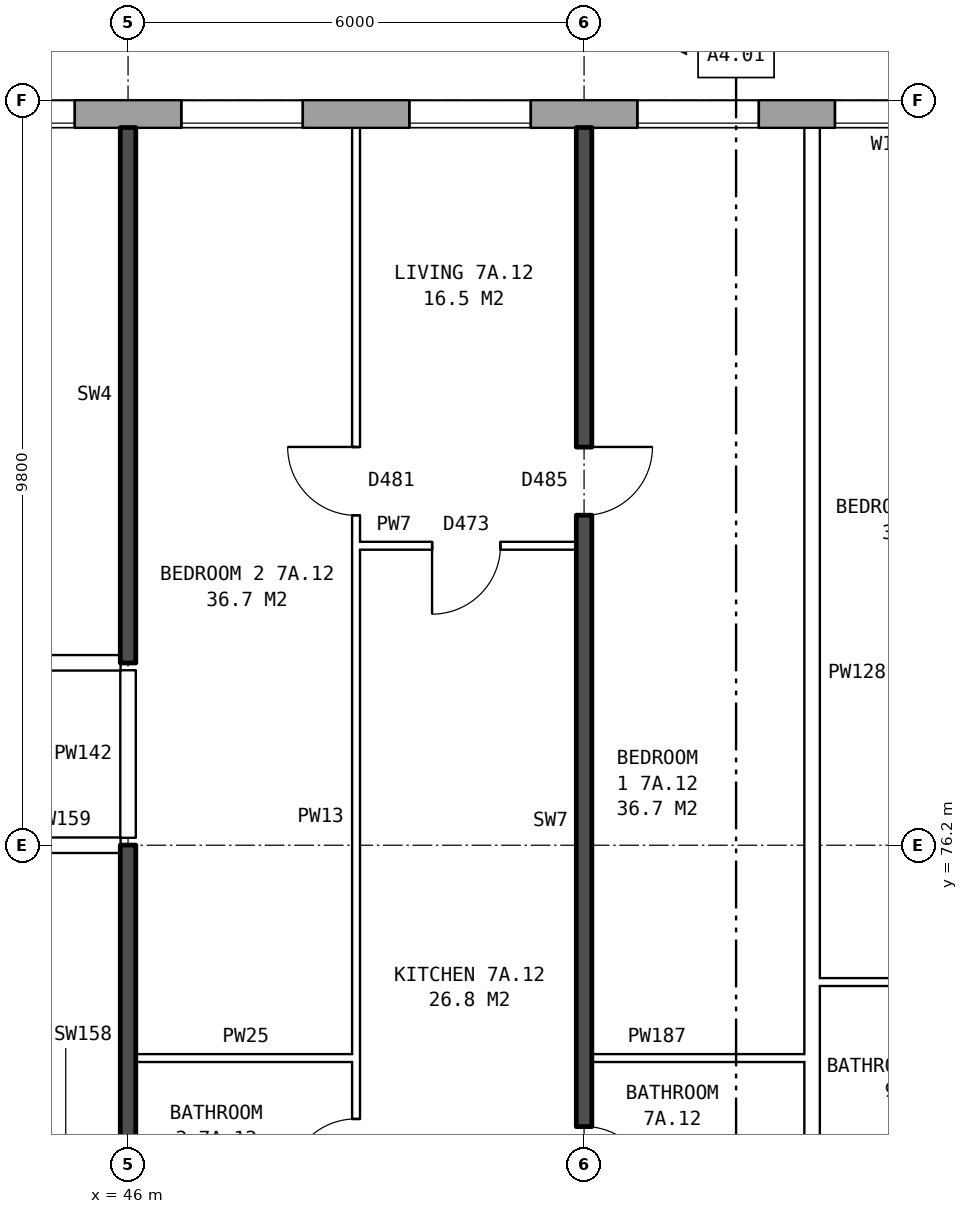
"""IFC4 building model, lengths in metres.
Left out: names, types, materials, properties, quantities, classifications, styles, units other than length and angle.
Written with IfcOpenShell. Run it as: python <this file> out.ifc"""

import sys

from ifc_helpers import new_model, si_unit, direction, frame, frame_2d, origin, place, context, subcontext, project, spatial, rectangle, extrude, element, fill, save


model = new_model("IFC4")
c1 = context("Model", 3, precision=1e-05, world=origin(), true_north=direction((0.0, 1.0)))
c2 = subcontext(c1, "Body", "Model", "MODEL_VIEW")
j1 = project(units=[si_unit("LENGTHUNIT", "METRE"), si_unit("PLANEANGLEUNIT", "RADIAN")], contexts=[c1])
p1 = place(None, origin())
s1 = spatial("IfcSite", under=j1, at=p1, CompositionType="ELEMENT")
p2 = place(p1, origin())
s2 = spatial("IfcBuilding", under=s1, at=p2, CompositionType="ELEMENT")
p3 = place(p2, frame((0.0, 0.0, 28.8)))
s3 = spatial("IfcBuildingStorey", under=s2, at=p3, CompositionType="ELEMENT", Elevation=28.8)
p4 = place(p3, frame((72.925, 85.82, 0.0), z_axis=(0.0, 0.0, 1.0), x_axis=(-1.0, 0.0, 0.0)))
e1 = element("IfcWall", 1, at=p4, inside=s3, PredefinedType="STANDARD", context=c2, shape_type="SweptSolid", body=[
    extrude(rectangle(XDim=50.101, YDim=0.36, at=frame_2d((25.05, 0.0))), origin(), (0.0, 0.0, 1.0), 2.85),
])
p5 = place(p4, frame((0.625, 0.0, 0.8)))
e2 = element("IfcOpeningElement", 2, at=p5, cuts=e1, PredefinedType="OPENING", context=c2, shape_type="SweptSolid", body=[
    extrude(rectangle(XDim=1.6, YDim=1.8, at=frame_2d((0.8, 0.9))), frame((0.0, 0.19, 0.0), z_axis=(0.0, -1.0, 0.0), x_axis=(1.0, 0.0, 0.0)), (0.0, 0.0, 1.0), 0.38),
])
p6 = place(p4, frame((3.625, 0.0, 0.8)))
e3 = element("IfcOpeningElement", 3, at=p6, cuts=e1, PredefinedType="OPENING", context=c2, shape_type="SweptSolid", body=[
    extrude(rectangle(XDim=1.6, YDim=1.8, at=frame_2d((0.8, 0.9))), frame((0.0, 0.19, 0.0), z_axis=(0.0, -1.0, 0.0), x_axis=(1.0, 0.0, 0.0)), (0.0, 0.0, 1.0), 0.38),
])
p7 = place(p4, frame((6.625, 0.0, 0.8)))
e4 = element("IfcOpeningElement", 4, at=p7, cuts=e1, PredefinedType="OPENING", context=c2, shape_type="SweptSolid", body=[
    extrude(rectangle(XDim=1.6, YDim=1.8, at=frame_2d((0.8, 0.9))), frame((0.0, 0.19, 0.0), z_axis=(0.0, -1.0, 0.0), x_axis=(1.0, 0.0, 0.0)), (0.0, 0.0, 1.0), 0.38),
])
p8 = place(p4, frame((9.625, 0.0, 0.8)))
e5 = element("IfcOpeningElement", 5, at=p8, cuts=e1, PredefinedType="OPENING", context=c2, shape_type="SweptSolid", body=[
    extrude(rectangle(XDim=1.6, YDim=1.8, at=frame_2d((0.8, 0.9))), frame((0.0, 0.19, 0.0), z_axis=(0.0, -1.0, 0.0), x_axis=(1.0, 0.0, 0.0)), (0.0, 0.0, 1.0), 0.38),
])
p9 = place(p4, frame((12.075, 0.0, 1.65)))
e6 = element("IfcOpeningElement", 6, at=p9, cuts=e1, PredefinedType="OPENING", context=c2, shape_type="SweptSolid", body=[
    extrude(rectangle(XDim=1.2, YDim=0.9, at=frame_2d((0.6, 0.45))), frame((0.0, 0.19, 0.0), z_axis=(0.0, -1.0, 0.0), x_axis=(1.0, 0.0, 0.0)), (0.0, 0.0, 1.0), 0.38),
])
p10 = place(p4, frame((15.325, 0.0, 0.8)))
e7 = element("IfcOpeningElement", 7, at=p10, cuts=e1, PredefinedType="OPENING", context=c2, shape_type="SweptSolid", body=[
    extrude(rectangle(XDim=0.6, YDim=1.2, at=frame_2d((0.3, 0.6))), frame((0.0, 0.19, 0.0), z_axis=(0.0, -1.0, 0.0), x_axis=(1.0, 0.0, 0.0)), (0.0, 0.0, 1.0), 0.38),
])
p11 = place(p4, frame((18.625, 0.0, 0.8)))
e8 = element("IfcOpeningElement", 8, at=p11, cuts=e1, PredefinedType="OPENING", context=c2, shape_type="SweptSolid", body=[
    extrude(rectangle(XDim=1.6, YDim=1.8, at=frame_2d((0.8, 0.9))), frame((0.0, 0.19, 0.0), z_axis=(0.0, -1.0, 0.0), x_axis=(1.0, 0.0, 0.0)), (0.0, 0.0, 1.0), 0.38),
])
p12 = place(p4, frame((21.625, 0.0, 0.8)))
e9 = element("IfcOpeningElement", 9, at=p12, cuts=e1, PredefinedType="OPENING", context=c2, shape_type="SweptSolid", body=[
    extrude(rectangle(XDim=1.6, YDim=1.8, at=frame_2d((0.8, 0.9))), frame((0.0, 0.19, 0.0), z_axis=(0.0, -1.0, 0.0), x_axis=(1.0, 0.0, 0.0)), (0.0, 0.0, 1.0), 0.38),
])
p13 = place(p4, frame((24.625, 0.0, 0.8)))
e10 = element("IfcOpeningElement", 10, at=p13, cuts=e1, PredefinedType="OPENING", context=c2, shape_type="SweptSolid", body=[
    extrude(rectangle(XDim=1.6, YDim=1.8, at=frame_2d((0.8, 0.9))), frame((0.0, 0.19, 0.0), z_axis=(0.0, -1.0, 0.0), x_axis=(1.0, 0.0, 0.0)), (0.0, 0.0, 1.0), 0.38),
])
p14 = place(p4, frame((27.625, 0.0, 0.8)))
e11 = element("IfcOpeningElement", 11, at=p14, cuts=e1, PredefinedType="OPENING", context=c2, shape_type="SweptSolid", body=[
    extrude(rectangle(XDim=1.6, YDim=1.8, at=frame_2d((0.8, 0.9))), frame((0.0, 0.19, 0.0), z_axis=(0.0, -1.0, 0.0), x_axis=(1.0, 0.0, 0.0)), (0.0, 0.0, 1.0), 0.38),
])
p15 = place(p4, frame((30.625, 0.0, 0.8)))
e12 = element("IfcOpeningElement", 12, at=p15, cuts=e1, PredefinedType="OPENING", context=c2, shape_type="SweptSolid", body=[
    extrude(rectangle(XDim=1.6, YDim=1.8, at=frame_2d((0.8, 0.9))), frame((0.0, 0.19, 0.0), z_axis=(0.0, -1.0, 0.0), x_axis=(1.0, 0.0, 0.0)), (0.0, 0.0, 1.0), 0.38),
])
p16 = place(p4, frame((33.125, 0.0, 0.8)))
e13 = element("IfcOpeningElement", 13, at=p16, cuts=e1, PredefinedType="OPENING", context=c2, shape_type="SweptSolid", body=[
    extrude(rectangle(XDim=1.2, YDim=1.5, at=frame_2d((0.6, 0.75))), frame((0.0, 0.19, 0.0), z_axis=(0.0, -1.0, 0.0), x_axis=(1.0, 0.0, 0.0)), (0.0, 0.0, 1.0), 0.38),
])
p17 = place(p4, frame((36.675, 0.0, 1.7)))
e14 = element("IfcOpeningElement", 14, at=p17, cuts=e1, PredefinedType="OPENING", context=c2, shape_type="SweptSolid", body=[
    extrude(rectangle(XDim=0.6, YDim=0.9, at=frame_2d((0.3, 0.45))), frame((0.0, 0.19, 0.0), z_axis=(0.0, -1.0, 0.0), x_axis=(1.0, 0.0, 0.0)), (0.0, 0.0, 1.0), 0.38),
])
p18 = place(p4, frame((39.625, 0.0, 0.8)))
e15 = element("IfcOpeningElement", 15, at=p18, cuts=e1, PredefinedType="OPENING", context=c2, shape_type="SweptSolid", body=[
    extrude(rectangle(XDim=1.6, YDim=1.8, at=frame_2d((0.8, 0.9))), frame((0.0, 0.19, 0.0), z_axis=(0.0, -1.0, 0.0), x_axis=(1.0, 0.0, 0.0)), (0.0, 0.0, 1.0), 0.38),
])
p19 = place(p4, frame((42.625, 0.0, 0.8)))
e16 = element("IfcOpeningElement", 16, at=p19, cuts=e1, PredefinedType="OPENING", context=c2, shape_type="SweptSolid", body=[
    extrude(rectangle(XDim=1.6, YDim=1.8, at=frame_2d((0.8, 0.9))), frame((0.0, 0.19, 0.0), z_axis=(0.0, -1.0, 0.0), x_axis=(1.0, 0.0, 0.0)), (0.0, 0.0, 1.0), 0.38),
])
p20 = place(p4, frame((45.625, 0.0, 0.8)))
e17 = element("IfcOpeningElement", 17, at=p20, cuts=e1, PredefinedType="OPENING", context=c2, shape_type="SweptSolid", body=[
    extrude(rectangle(XDim=1.6, YDim=1.8, at=frame_2d((0.8, 0.9))), frame((0.0, 0.19, 0.0), z_axis=(0.0, -1.0, 0.0), x_axis=(1.0, 0.0, 0.0)), (0.0, 0.0, 1.0), 0.38),
])
p21 = place(p4, frame((13.875, 0.0, 0.15)))
e18 = element("IfcOpeningElement", 18, at=p21, cuts=e1, PredefinedType="OPENING", context=c2, shape_type="SweptSolid", body=[
    extrude(rectangle(XDim=0.8, YDim=0.9, at=frame_2d((0.4, 0.45))), frame((0.0, 0.19, 0.0), z_axis=(0.0, -1.0, 0.0), x_axis=(1.0, 0.0, 0.0)), (0.0, 0.0, 1.0), 0.38),
])
p22 = place(p4, frame((16.225, 0.0, 0.8)))
e19 = element("IfcOpeningElement", 19, at=p22, cuts=e1, PredefinedType="OPENING", context=c2, shape_type="SweptSolid", body=[
    extrude(rectangle(XDim=1.4, YDim=1.8, at=frame_2d((0.7, 0.9))), frame((0.0, 0.19, 0.0), z_axis=(0.0, -1.0, 0.0), x_axis=(1.0, 0.0, 0.0)), (0.0, 0.0, 1.0), 0.38),
])
p23 = place(p4, frame((34.625, 0.0, 0.8)))
e20 = element("IfcOpeningElement", 20, at=p23, cuts=e1, PredefinedType="OPENING", context=c2, shape_type="SweptSolid", body=[
    extrude(rectangle(XDim=0.6, YDim=0.9, at=frame_2d((0.3, 0.45))), frame((0.0, 0.19, 0.0), z_axis=(0.0, -1.0, 0.0), x_axis=(1.0, 0.0, 0.0)), (0.0, 0.0, 1.0), 0.38),
])
p24 = place(p4, frame((37.575, 0.0, 1.1)))
e21 = element("IfcOpeningElement", 21, at=p24, cuts=e1, PredefinedType="OPENING", context=c2, shape_type="SweptSolid", body=[
    extrude(rectangle(XDim=1.0, YDim=1.5, at=frame_2d((0.5, 0.75))), frame((0.0, 0.19, 0.0), z_axis=(0.0, -1.0, 0.0), x_axis=(1.0, 0.0, 0.0)), (0.0, 0.0, 1.0), 0.38),
])
p25 = place(p3, frame((46.1, 73.4, 0.0), z_axis=(0.0, 0.0, 1.0), x_axis=(1.0, 0.0, 0.0)))
e22 = element("IfcWall", 22, at=p25, inside=s3, PredefinedType="PARTITIONING", context=c2, shape_type="SweptSolid", body=[
    extrude(rectangle(XDim=2.9, YDim=0.1, at=frame_2d((1.45, 0.0))), origin(), (0.0, 0.0, 1.0), 2.85),
])
for number, where, z_axis, x_axis in (
    (23, (52.1, 73.4, 0.0), (0.0, 0.0, 1.0), (1.0, 0.0, 0.0)),
    (24, (55.1, 74.4, 0.0), (0.0, 0.0, 1.0), (1.0, 0.0, 0.0)),
):
    element("IfcWall", number, at=place(p3, frame(where, z_axis=z_axis, x_axis=x_axis)), inside=s3, PredefinedType="PARTITIONING", context=c2, shape_type="SweptSolid", body=[
        extrude(rectangle(XDim=2.8, YDim=0.1, at=frame_2d((1.4, 0.0))), origin(), (0.0, 0.0, 1.0), 2.85),
    ])
p26 = place(p3, frame((44.36, 76.2, 0.0), z_axis=(0.0, 0.0, 1.0), x_axis=(1.0, 0.0, 0.0)))
e25 = element("IfcWall", 25, at=p26, inside=s3, PredefinedType="PARTITIONING", context=c2, shape_type="SweptSolid", body=[
    extrude(rectangle(XDim=1.54, YDim=0.2, at=frame_2d((0.77, 0.0))), origin(), (0.0, 0.0, 1.0), 2.85),
])
p27 = place(p3, frame((20.11, 78.6, 0.0), z_axis=(0.0, 0.0, 1.0), x_axis=(1.0, 0.0, 0.0)))
e26 = element("IfcWall", 26, at=p27, inside=s3, PredefinedType="PARTITIONING", context=c2, shape_type="SweptSolid", body=[
    extrude(rectangle(XDim=25.79, YDim=0.2, at=frame_2d((12.895, 0.0))), origin(), (0.0, 0.0, 1.0), 2.85),
])
p28 = place(p27, frame((22.34, 0.0, 0.0)))
e27 = element("IfcOpeningElement", 27, at=p28, cuts=e26, PredefinedType="OPENING", context=c2, shape_type="SweptSolid", body=[
    extrude(rectangle(XDim=1.0, YDim=2.1, at=frame_2d((0.5, 1.05))), frame((0.0, 0.11, 0.0), z_axis=(0.0, -1.0, 0.0), x_axis=(1.0, 0.0, 0.0)), (0.0, 0.0, 1.0), 0.22),
])
p29 = place(p27, frame((10.39, 0.0, 0.0)))
e28 = element("IfcOpeningElement", 28, at=p29, cuts=e26, PredefinedType="OPENING", context=c2, shape_type="SweptSolid", body=[
    extrude(rectangle(XDim=1.0, YDim=2.1, at=frame_2d((0.5, 1.05))), frame((0.0, 0.11, 0.0), z_axis=(0.0, -1.0, 0.0), x_axis=(1.0, 0.0, 0.0)), (0.0, 0.0, 1.0), 0.22),
])
p30 = place(p27, frame((2.245, 0.0, 0.0)))
e29 = element("IfcOpeningElement", 29, at=p30, cuts=e26, PredefinedType="OPENING", context=c2, shape_type="SweptSolid", body=[
    extrude(rectangle(XDim=1.0, YDim=2.1, at=frame_2d((0.5, 1.05))), frame((0.0, 0.11, 0.0), z_axis=(0.0, -1.0, 0.0), x_axis=(1.0, 0.0, 0.0)), (0.0, 0.0, 1.0), 0.22),
])
p31 = place(p3, frame((49.0, 80.14, 0.0), z_axis=(0.0, 0.0, 1.0), x_axis=(1.0, 0.0, 0.0)))
e30 = element("IfcWall", 30, at=p31, inside=s3, PredefinedType="PARTITIONING", context=c2, shape_type="SweptSolid", body=[
    extrude(rectangle(XDim=2.9, YDim=0.1, at=frame_2d((1.45, 0.0))), origin(), (0.0, 0.0, 1.0), 2.85),
])
p32 = place(p31, frame((1.0, 0.0, 0.0)))
e31 = element("IfcOpeningElement", 31, at=p32, cuts=e30, PredefinedType="OPENING", context=c2, shape_type="SweptSolid", body=[
    extrude(rectangle(XDim=0.9, YDim=2.1, at=frame_2d((0.45, 1.05))), frame((0.0, 0.06, 0.0), z_axis=(0.0, -1.0, 0.0), x_axis=(1.0, 0.0, 0.0)), (0.0, 0.0, 1.0), 0.12),
])
p33 = place(p3, frame((46.0, 71.2, 0.0), z_axis=(0.0, 0.0, 1.0), x_axis=(0.0, 1.0, 0.0)))
e32 = element("IfcWall", 32, at=p33, inside=s3, PredefinedType="SOLIDWALL", context=c2, shape_type="SweptSolid", body=[
    extrude(rectangle(XDim=5.0, YDim=0.2, at=frame_2d((2.5, 0.0))), origin(), (0.0, 0.0, 1.0), 2.85),
])
p34 = place(p3, frame((46.0, 76.3, 0.0), z_axis=(0.0, 0.0, 1.0), x_axis=(0.0, 1.0, 0.0)))
e33 = element("IfcWall", 33, at=p34, inside=s3, PredefinedType="PARTITIONING", context=c2, shape_type="SweptSolid", body=[
    extrude(rectangle(XDim=2.2, YDim=0.2, at=frame_2d((1.1, 0.0))), origin(), (0.0, 0.0, 1.0), 2.85),
])
p35 = place(p3, frame((46.0, 78.6, 0.0), z_axis=(0.0, 0.0, 1.0), x_axis=(0.0, 1.0, 0.0)))
e34 = element("IfcWall", 34, at=p35, inside=s3, PredefinedType="SOLIDWALL", context=c2, shape_type="SweptSolid", body=[
    extrude(rectangle(XDim=7.04, YDim=0.2, at=frame_2d((3.52, 0.0))), origin(), (0.0, 0.0, 1.0), 2.85),
])
p36 = place(p3, frame((49.0, 71.3, 0.0), z_axis=(0.0, 0.0, 1.0), x_axis=(0.0, 1.0, 0.0)))
e35 = element("IfcWall", 35, at=p36, inside=s3, PredefinedType="PARTITIONING", context=c2, shape_type="SweptSolid", body=[
    extrude(rectangle(XDim=14.34, YDim=0.1, at=frame_2d((7.17, 0.0))), origin(), (0.0, 0.0, 1.0), 2.85),
])
p37 = place(p36, frame((9.24, 0.0, 0.0)))
e36 = element("IfcOpeningElement", 36, at=p37, cuts=e35, PredefinedType="OPENING", context=c2, shape_type="SweptSolid", body=[
    extrude(rectangle(XDim=0.9, YDim=2.1, at=frame_2d((0.45, 1.05))), frame((0.0, 0.06, 0.0), z_axis=(0.0, -1.0, 0.0), x_axis=(1.0, 0.0, 0.0)), (0.0, 0.0, 1.0), 0.12),
])
p38 = place(p36, frame((0.4, 0.0, 0.0)))
e37 = element("IfcOpeningElement", 37, at=p38, cuts=e35, PredefinedType="OPENING", context=c2, shape_type="SweptSolid", body=[
    extrude(rectangle(XDim=0.9, YDim=2.1, at=frame_2d((0.45, 1.05))), frame((0.0, 0.06, 0.0), z_axis=(0.0, -1.0, 0.0), x_axis=(1.0, 0.0, 0.0)), (0.0, 0.0, 1.0), 0.12),
])
p39 = place(p3, frame((52.0, 71.2, 0.0), z_axis=(0.0, 0.0, 1.0), x_axis=(0.0, 1.0, 0.0)))
e38 = element("IfcWall", 38, at=p39, inside=s3, PredefinedType="SOLIDWALL", context=c2, shape_type="SweptSolid", body=[
    extrude(rectangle(XDim=14.44, YDim=0.2, at=frame_2d((7.22, 0.0))), origin(), (0.0, 0.0, 1.0), 2.85),
])
p40 = place(p39, frame((9.34, 0.0, 0.0)))
e39 = element("IfcOpeningElement", 39, at=p40, cuts=e38, PredefinedType="OPENING", context=c2, shape_type="SweptSolid", body=[
    extrude(rectangle(XDim=0.9, YDim=2.1, at=frame_2d((0.45, 1.05))), frame((0.0, 0.11, 0.0), z_axis=(0.0, -1.0, 0.0), x_axis=(1.0, 0.0, 0.0)), (0.0, 0.0, 1.0), 0.22),
])
p41 = place(p39, frame((0.4, 0.0, 0.0)))
e40 = element("IfcOpeningElement", 40, at=p41, cuts=e38, PredefinedType="OPENING", context=c2, shape_type="SweptSolid", body=[
    extrude(rectangle(XDim=0.9, YDim=2.1, at=frame_2d((0.45, 1.05))), frame((0.0, 0.11, 0.0), z_axis=(0.0, -1.0, 0.0), x_axis=(1.0, 0.0, 0.0)), (0.0, 0.0, 1.0), 0.22),
])
p42 = place(p3, frame((55.0, 71.3, 0.0), z_axis=(0.0, 0.0, 1.0), x_axis=(0.0, 1.0, 0.0)))
e41 = element("IfcWall", 41, at=p42, inside=s3, PredefinedType="PARTITIONING", context=c2, shape_type="SweptSolid", body=[
    extrude(rectangle(XDim=14.34, YDim=0.2, at=frame_2d((7.17, 0.0))), origin(), (0.0, 0.0, 1.0), 2.85),
])
p43 = place(p11, origin())
e42 = element("IfcWindow", 42, at=p43, inside=s3, PartitioningType="SINGLE_PANEL", PredefinedType="WINDOW", context=c2, shape_type="SweptSolid", body=[
    extrude(rectangle(XDim=1.6, YDim=1.8, at=frame_2d((0.8, 0.9))), frame((0.0, 0.15, 0.0), z_axis=(0.0, -1.0, 0.0), x_axis=(1.0, 0.0, 0.0)), (0.0, 0.0, 1.0), 0.06),
])
fill(e8, e42)
p44 = place(p12, origin())
e43 = element("IfcWindow", 43, at=p44, inside=s3, PartitioningType="SINGLE_PANEL", PredefinedType="WINDOW", context=c2, shape_type="SweptSolid", body=[
    extrude(rectangle(XDim=1.6, YDim=1.8, at=frame_2d((0.8, 0.9))), frame((0.0, 0.15, 0.0), z_axis=(0.0, -1.0, 0.0), x_axis=(1.0, 0.0, 0.0)), (0.0, 0.0, 1.0), 0.06),
])
fill(e9, e43)
p45 = place(p13, origin())
e44 = element("IfcWindow", 44, at=p45, inside=s3, PartitioningType="SINGLE_PANEL", PredefinedType="WINDOW", context=c2, shape_type="SweptSolid", body=[
    extrude(rectangle(XDim=1.6, YDim=1.8, at=frame_2d((0.8, 0.9))), frame((0.0, 0.15, 0.0), z_axis=(0.0, -1.0, 0.0), x_axis=(1.0, 0.0, 0.0)), (0.0, 0.0, 1.0), 0.06),
])
fill(e10, e44)
p46 = place(p14, origin())
e45 = element("IfcWindow", 45, at=p46, inside=s3, PartitioningType="SINGLE_PANEL", PredefinedType="WINDOW", context=c2, shape_type="SweptSolid", body=[
    extrude(rectangle(XDim=1.6, YDim=1.8, at=frame_2d((0.8, 0.9))), frame((0.0, 0.15, 0.0), z_axis=(0.0, -1.0, 0.0), x_axis=(1.0, 0.0, 0.0)), (0.0, 0.0, 1.0), 0.06),
])
fill(e11, e45)
p47 = place(p40, frame((0.9, 0.0, 0.0), z_axis=(0.0, 0.0, 1.0), x_axis=(-1.0, 0.0, 0.0)))
e46 = element("IfcDoor", 46, at=p47, inside=s3, OperationType="SINGLE_SWING_LEFT", PredefinedType="DOOR", context=c2, shape_type="SweptSolid", body=[
    extrude(rectangle(XDim=0.9, YDim=2.1, at=frame_2d((0.45, 1.05))), frame((0.0, 0.025, 0.0), z_axis=(0.0, -1.0, 0.0), x_axis=(1.0, 0.0, 0.0)), (0.0, 0.0, 1.0), 0.05),
])
fill(e39, e46)
p48 = place(p37, origin())
e47 = element("IfcDoor", 47, at=p48, inside=s3, OperationType="SINGLE_SWING_RIGHT", PredefinedType="DOOR", context=c2, shape_type="SweptSolid", body=[
    extrude(rectangle(XDim=0.9, YDim=2.1, at=frame_2d((0.45, 1.05))), frame((0.0, 0.025, 0.0), z_axis=(0.0, -1.0, 0.0), x_axis=(1.0, 0.0, 0.0)), (0.0, 0.0, 1.0), 0.05),
])
fill(e36, e47)
p49 = place(p32, frame((0.9, 0.0, 0.0), z_axis=(0.0, 0.0, 1.0), x_axis=(-1.0, 0.0, 0.0)))
e48 = element("IfcDoor", 48, at=p49, inside=s3, OperationType="SINGLE_SWING_RIGHT", PredefinedType="DOOR", context=c2, shape_type="SweptSolid", body=[
    extrude(rectangle(XDim=0.9, YDim=2.1, at=frame_2d((0.45, 1.05))), frame((0.0, 0.025, 0.0), z_axis=(0.0, -1.0, 0.0), x_axis=(1.0, 0.0, 0.0)), (0.0, 0.0, 1.0), 0.05),
])
fill(e31, e48)
p50 = place(p41, frame((0.9, 0.0, 0.0), z_axis=(0.0, 0.0, 1.0), x_axis=(-1.0, 0.0, 0.0)))
e49 = element("IfcDoor", 49, at=p50, inside=s3, OperationType="SINGLE_SWING_RIGHT", PredefinedType="DOOR", context=c2, shape_type="SweptSolid", body=[
    extrude(rectangle(XDim=0.9, YDim=2.1, at=frame_2d((0.45, 1.05))), frame((0.0, 0.025, 0.0), z_axis=(0.0, -1.0, 0.0), x_axis=(1.0, 0.0, 0.0)), (0.0, 0.0, 1.0), 0.05),
])
fill(e40, e49)
p51 = place(p38, origin())
e50 = element("IfcDoor", 50, at=p51, inside=s3, OperationType="SINGLE_SWING_LEFT", PredefinedType="DOOR", context=c2, shape_type="SweptSolid", body=[
    extrude(rectangle(XDim=0.9, YDim=2.1, at=frame_2d((0.45, 1.05))), frame((0.0, 0.025, 0.0), z_axis=(0.0, -1.0, 0.0), x_axis=(1.0, 0.0, 0.0)), (0.0, 0.0, 1.0), 0.05),
])
fill(e37, e50)
p52 = place(p22, origin())
e51 = element("IfcWindow", 51, at=p52, inside=s3, PartitioningType="SINGLE_PANEL", PredefinedType="WINDOW", context=c2, shape_type="SweptSolid", body=[
    extrude(rectangle(XDim=1.4, YDim=1.8, at=frame_2d((0.7, 0.9))), frame((0.0, 0.15, 0.0), z_axis=(0.0, -1.0, 0.0), x_axis=(1.0, 0.0, 0.0)), (0.0, 0.0, 1.0), 0.06),
])
fill(e19, e51)
save(model, sys.argv[1])
